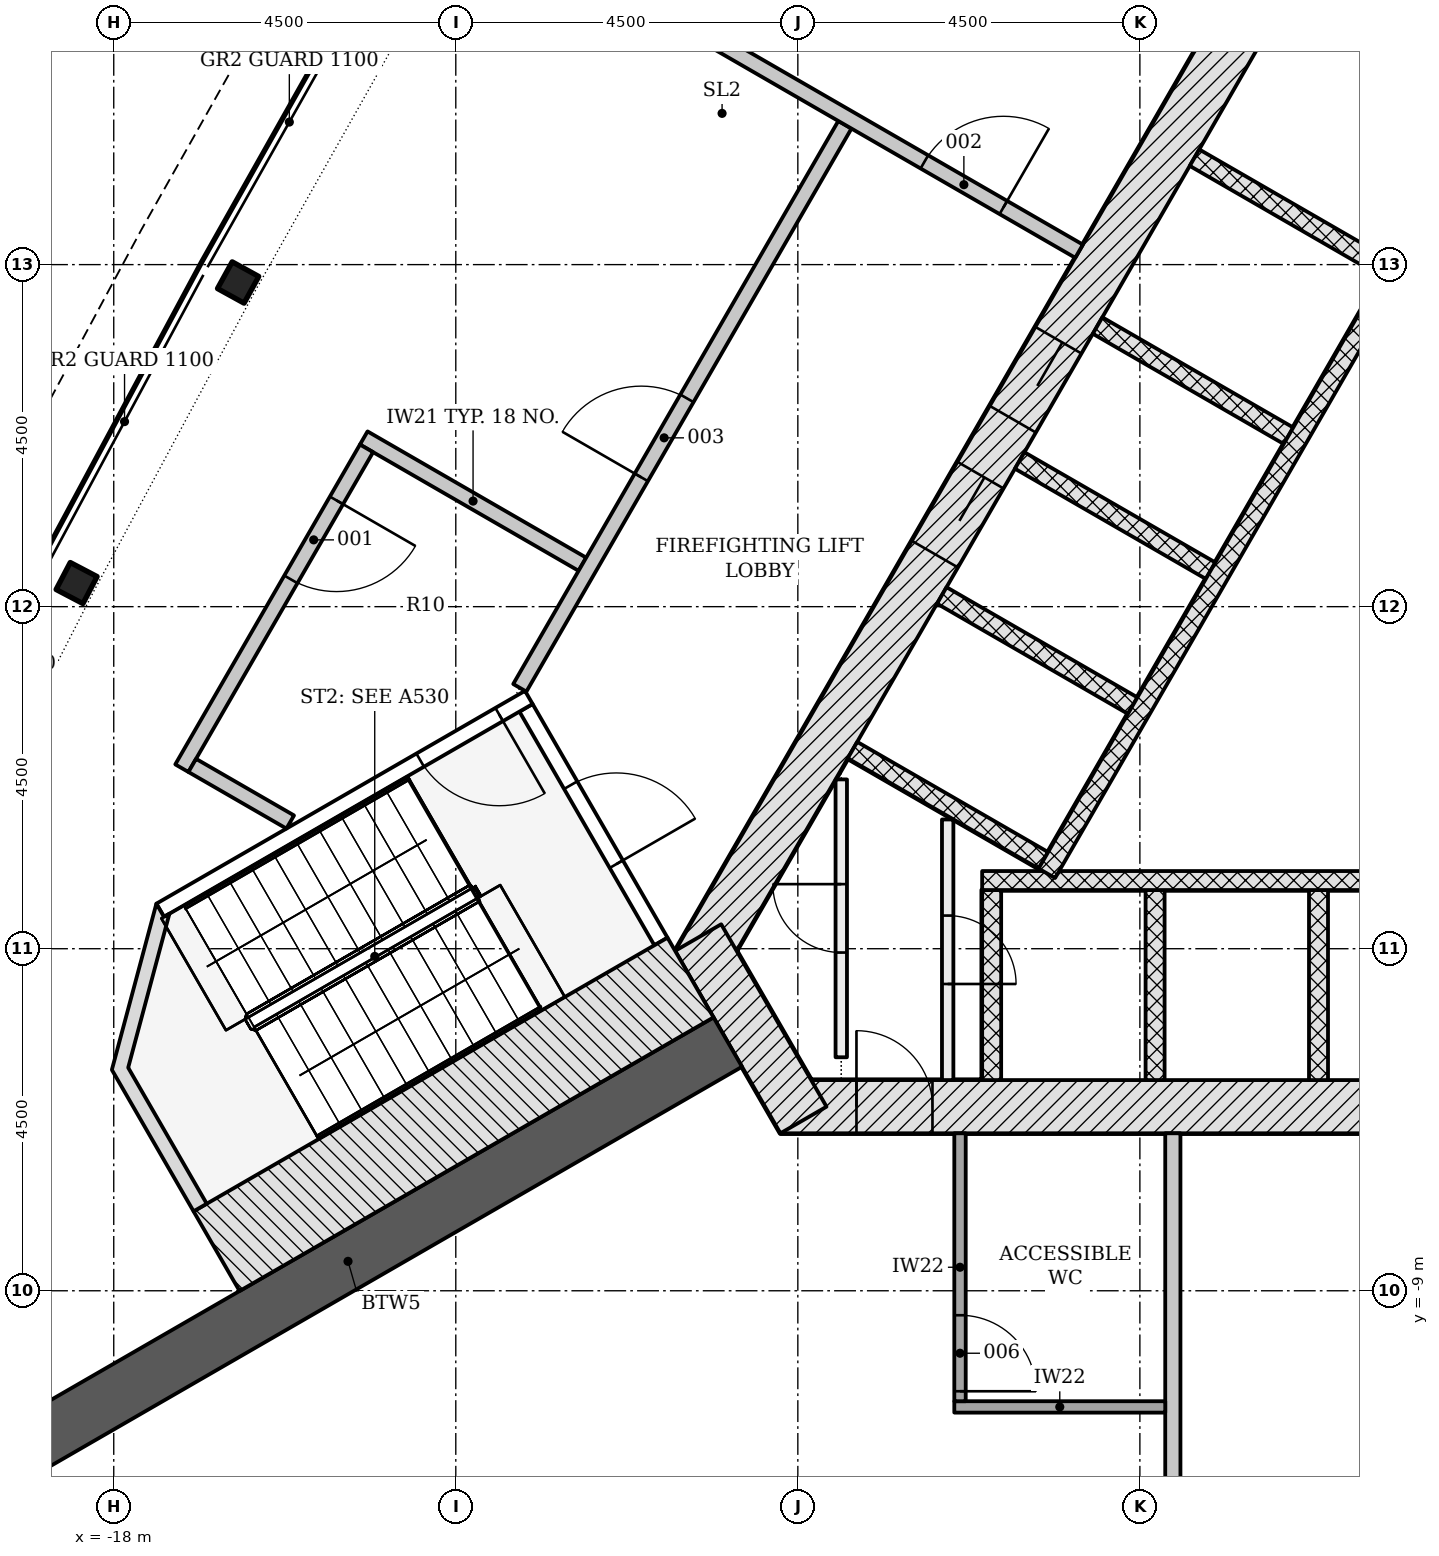
"""IFC4 building model, lengths in metres.
Left out: names, types, materials, properties, quantities, classifications, styles, units other than length and angle.
Written with IfcOpenShell. Run it as: python <this file> out.ifc"""

import sys

from ifc_helpers import new_model, si_unit, direction, frame, frame_2d, origin, origin_2d, place, context, subcontext, project, spatial, polyline, rectangle, i_section, outline, extrude, element, fill, save


model = new_model("IFC4")
c1 = context("Model", 3, precision=1e-05, world=origin(), true_north=direction((0.0, 1.0)))
c2 = subcontext(c1, "Body", "Model", "MODEL_VIEW")
j1 = project(units=[si_unit("LENGTHUNIT", "METRE"), si_unit("PLANEANGLEUNIT", "RADIAN")], contexts=[c1])
p1 = place(None, origin())
s1 = spatial("IfcSite", under=j1, at=p1, CompositionType="ELEMENT")
p2 = place(p1, origin())
s2 = spatial("IfcBuilding", under=s1, at=p2, CompositionType="ELEMENT")
p3 = place(p2, frame((0.0, 0.0, 127.5)))
s3 = spatial("IfcBuildingStorey", under=s2, at=p3, CompositionType="ELEMENT", Elevation=127.5)
p4 = place(p3, frame((-9.229, -6.578, -0.3), z_axis=(0.0, 0.0, 1.0), x_axis=(1.0, 0.0, 0.0)))
e1 = element("IfcWall", 1, at=p4, inside=s3, PredefinedType="SHEAR", context=c2, shape_type="SweptSolid", body=[
    extrude(rectangle(XDim=18.458, YDim=0.7, at=frame_2d((9.229, 0.0))), origin(), (0.0, 0.0, 1.0), 7.2),
])
p5 = place(p4, frame((1.0, 0.0, 0.3)))
e2 = element("IfcOpeningElement", 2, at=p5, cuts=e1, PredefinedType="OPENING", context=c2, shape_type="SweptSolid", body=[
    extrude(rectangle(XDim=1.0, YDim=2.1, at=frame_2d((0.5, 1.05))), frame((0.0, 0.36, 0.0), z_axis=(0.0, -1.0, 0.0), x_axis=(1.0, 0.0, 0.0)), (0.0, 0.0, 1.0), 0.72),
])
p6 = place(p4, frame((16.479, 0.0, 0.3)))
e3 = element("IfcOpeningElement", 3, at=p6, cuts=e1, PredefinedType="OPENING", context=c2, shape_type="SweptSolid", body=[
    extrude(rectangle(XDim=0.9, YDim=2.1, at=frame_2d((0.45, 1.05))), frame((0.0, 0.36, 0.0), z_axis=(0.0, -1.0, 0.0), x_axis=(1.0, 0.0, 0.0)), (0.0, 0.0, 1.0), 0.72),
])
p7 = place(p3, frame((-1.083, 11.281, -0.3), z_axis=(0.0, 0.0, 1.0), x_axis=(-0.500001446645, -0.866024568562, 0.0)))
e4 = element("IfcWall", 4, at=p7, inside=s3, PredefinedType="SHEAR", context=c2, shape_type="SweptSolid", body=[
    extrude(rectangle(XDim=18.458, YDim=0.7, at=frame_2d((9.229, 0.0))), origin(), (0.0, 0.0, 1.0), 7.2),
])
p8 = place(p7, frame((8.979, 0.0, 0.3)))
e5 = element("IfcOpeningElement", 5, at=p8, cuts=e4, PredefinedType="OPENING", context=c2, shape_type="SweptSolid", body=[
    extrude(rectangle(XDim=1.2, YDim=2.1, at=frame_2d((0.6, 1.05))), frame((0.0, 0.36, 0.0), z_axis=(0.0, -1.0, 0.0), x_axis=(1.0, 0.0, 0.0)), (0.0, 0.0, 1.0), 0.72),
])
p9 = place(p7, frame((11.029, 0.0, 0.3)))
e6 = element("IfcOpeningElement", 6, at=p9, cuts=e4, PredefinedType="OPENING", context=c2, shape_type="SweptSolid", body=[
    extrude(rectangle(XDim=1.2, YDim=2.1, at=frame_2d((0.6, 1.05))), frame((0.0, 0.36, 0.0), z_axis=(0.0, -1.0, 0.0), x_axis=(1.0, 0.0, 0.0)), (0.0, 0.0, 1.0), 0.72),
])
p10 = place(p3, frame((-10.311, -4.353, -0.3), z_axis=(0.0, 0.0, 1.0), x_axis=(0.500042739161, -0.866000726912, 0.0)))
e7 = element("IfcWall", 7, at=p10, inside=s3, PredefinedType="SHEAR", context=c2, shape_type="SweptSolid", body=[
    extrude(rectangle(XDim=2.771, YDim=0.7, at=frame_2d((1.386, 0.0))), origin(), (0.0, 0.0, 1.0), 7.2),
])
p11 = place(p3, frame((-9.922, -5.728, -0.3), z_axis=(0.0, 0.0, 1.0), x_axis=(-0.866024913782, -0.500000848707, 0.0)))
e8 = element("IfcWall", 8, at=p11, inside=s3, PredefinedType="SHEAR", context=c2, shape_type="SweptSolid", body=[
    extrude(rectangle(XDim=11.539, YDim=0.75, at=frame_2d((5.769, 0.0))), origin(), (0.0, 0.0, 1.0), 7.2),
])
for number, where, z_axis, x_axis in (
    (9, (-16.364, 4.265, -0.3), (0.0, 0.0, 1.0), (-0.482, -0.876, 0.0)),
    (10, (-18.489, 0.311, -0.3), (0.0, 0.0, 1.0), (-0.464, -0.886, 0.0)),
):
    element("IfcColumn", number, at=place(p3, frame(where, z_axis=z_axis, x_axis=x_axis)), inside=s3, PredefinedType="COLUMN", context=c2, shape_type="SweptSolid", body=[
        extrude(i_section(OverallWidth=0.401, OverallDepth=0.399, WebThickness=0.025, FlangeThickness=0.04, FilletRadius=0.015, at=origin_2d()), origin(), (0.0, 0.0, 1.0), 7.2),
    ])
for number, where, z_axis, x_axis in (
    (11, (-6.45, -6.228, -0.3), (0.0, 0.0, 1.0), (0.0, 1.0, 0.0)),
    (12, (-4.3, -6.228, -0.3), (0.0, 0.0, 1.0), (0.0, 1.0, 0.0)),
    (13, (-2.15, -6.228, -0.3), (0.0, 0.0, 1.0), (0.0, 1.0, 0.0)),
):
    element("IfcWall", number, at=place(p3, frame(where, z_axis=z_axis, x_axis=x_axis)), inside=s3, PredefinedType="PARTITIONING", context=c2, shape_type="SweptSolid", body=[
        extrude(rectangle(XDim=2.5, YDim=0.25, at=frame_2d((1.25, 0.0))), origin(), (0.0, 0.0, 1.0), 7.2),
    ])
p12 = place(p3, frame((-6.575, -3.603, 0.0), z_axis=(0.0, 0.0, 1.0), x_axis=(1.0, 0.0, 0.0)))
e14 = element("IfcWall", 14, at=p12, inside=s3, PredefinedType="PARTITIONING", context=c2, shape_type="SweptSolid", body=[
    extrude(rectangle(XDim=13.15, YDim=0.25, at=frame_2d((6.575, 0.0))), origin(), (0.0, 0.0, 1.0), 6.9),
])
p13 = place(p3, frame((-2.506, 8.115, -0.3), z_axis=(0.0, 0.0, 1.0), x_axis=(0.865996321171, -0.50005036918, 0.0)))
e15 = element("IfcWall", 15, at=p13, inside=s3, PredefinedType="PARTITIONING", context=c2, shape_type="SweptSolid", body=[
    extrude(rectangle(XDim=2.9, YDim=0.25, at=frame_2d((1.45, 0.0))), origin(), (0.0, 0.0, 1.0), 7.2),
])
for number, where, z_axis, x_axis in (
    (16, (-3.781, 5.907, -0.3), (0.0, 0.0, 1.0), (0.866, -0.5, 0.0)),
    (17, (-5.056, 3.699, -0.3), (0.0, 0.0, 1.0), (0.866, -0.5, 0.0)),
    (18, (-6.081, 1.923, -0.3), (0.0, 0.0, 1.0), (0.866, -0.5, 0.0)),
    (19, (-7.106, 0.148, -0.3), (0.0, 0.0, 1.0), (0.866, -0.5, 0.0)),
    (20, (-8.281, -1.887, -0.3), (0.0, 0.0, 1.0), (0.866, -0.5, 0.0)),
):
    element("IfcWall", number, at=place(p3, frame(where, z_axis=z_axis, x_axis=x_axis)), inside=s3, PredefinedType="PARTITIONING", context=c2, shape_type="SweptSolid", body=[
        extrude(rectangle(XDim=2.9, YDim=0.25, at=frame_2d((1.45, 0.0))), origin(), (0.0, 0.0, 1.0), 7.2),
    ])
p14 = place(p3, frame((0.176, 6.711, 0.0), z_axis=(0.0, 0.0, 1.0), x_axis=(-0.500004227369, -0.866022963098, 0.0)))
e21 = element("IfcWall", 21, at=p14, inside=s3, PredefinedType="PARTITIONING", context=c2, shape_type="SweptSolid", body=[
    extrude(rectangle(XDim=11.8, YDim=0.25, at=frame_2d((5.9, 0.0))), origin(), (0.0, 0.0, 1.0), 6.9),
])
p15 = place(p3, frame((-8.429, -5.928, 0.0), z_axis=(0.0, 0.0, 1.0), x_axis=(0.0, 1.0, 0.0)))
e22 = element("IfcWall", 22, at=p15, inside=s3, PredefinedType="PARTITIONING", context=c2, shape_type="SweptSolid", body=[
    extrude(rectangle(XDim=3.656, YDim=0.15, at=frame_2d((1.828, 0.0))), origin(), (0.0, 0.0, 1.0), 6.9),
])
p16 = place(p15, frame((1.378, 0.0, 0.0)))
e23 = element("IfcOpeningElement", 23, at=p16, cuts=e22, PredefinedType="OPENING", context=c2, shape_type="SweptSolid", body=[
    extrude(rectangle(XDim=0.9, YDim=2.1, at=frame_2d((0.45, 1.05))), frame((0.0, 0.085, 0.0), z_axis=(0.0, -1.0, 0.0), x_axis=(1.0, 0.0, 0.0)), (0.0, 0.0, 1.0), 0.17),
])
p17 = place(p3, frame((-7.029, -2.8, 0.0), z_axis=(0.0, 0.0, 1.0), x_axis=(0.0, -1.0, 0.0)))
e24 = element("IfcWall", 24, at=p17, inside=s3, PredefinedType="PARTITIONING", context=c2, shape_type="SweptSolid", body=[
    extrude(rectangle(XDim=3.428, YDim=0.15, at=frame_2d((1.714, 0.0))), origin(), (0.0, 0.0, 1.0), 6.9),
])
p18 = place(p17, frame((1.264, 0.0, 0.0)))
e25 = element("IfcOpeningElement", 25, at=p18, cuts=e24, PredefinedType="OPENING", context=c2, shape_type="SweptSolid", body=[
    extrude(rectangle(XDim=0.9, YDim=2.1, at=frame_2d((0.45, 1.05))), frame((0.0, 0.085, 0.0), z_axis=(0.0, -1.0, 0.0), x_axis=(1.0, 0.0, 0.0)), (0.0, 0.0, 1.0), 0.17),
])
p19 = place(p3, frame((-12.576, -1.331, -0.3), z_axis=(0.0, 0.0, 1.0), x_axis=(0.499970499736, -0.8660424351, 0.0)))
e26 = element("IfcWall", 26, at=p19, inside=s3, PredefinedType="SHEAR", context=c2, shape_type="SweptSolid", body=[
    extrude(rectangle(XDim=3.55, YDim=0.2, at=frame_2d((1.775, 0.0))), origin(), (0.0, 0.0, 1.0), 7.2),
])
p20 = place(p19, frame((1.175, 0.0, 0.3)))
e27 = element("IfcOpeningElement", 27, at=p20, cuts=e26, PredefinedType="OPENING", context=c2, shape_type="SweptSolid", body=[
    extrude(rectangle(XDim=1.2, YDim=2.1, at=frame_2d((0.6, 1.05))), frame((0.0, 0.11, 0.0), z_axis=(0.0, -1.0, 0.0), x_axis=(1.0, 0.0, 0.0)), (0.0, 0.0, 1.0), 0.22),
])
p21 = place(p3, frame((-12.539, -1.194, -0.3), z_axis=(0.0, 0.0, 1.0), x_axis=(-0.866045472092, -0.499965239061, 0.0)))
e28 = element("IfcWall", 28, at=p21, inside=s3, PredefinedType="SHEAR", context=c2, shape_type="SweptSolid", body=[
    extrude(rectangle(XDim=5.6, YDim=0.2, at=frame_2d((2.8, 0.0))), origin(), (0.0, 0.0, 1.0), 7.2),
])
p22 = place(p21, frame((0.45, 0.0, 0.3)))
e29 = element("IfcOpeningElement", 29, at=p22, cuts=e28, PredefinedType="OPENING", context=c2, shape_type="SweptSolid", body=[
    extrude(rectangle(XDim=1.2, YDim=2.1, at=frame_2d((0.6, 1.05))), frame((0.0, 0.11, 0.0), z_axis=(0.0, -1.0, 0.0), x_axis=(1.0, 0.0, 0.0)), (0.0, 0.0, 1.0), 0.22),
])
p23 = place(p3, frame((-10.412, -4.879, -0.3), z_axis=(0.0, 0.0, 1.0), x_axis=(-0.866026919366, -0.499997374926, 0.0)))
e30 = element("IfcWall", 30, at=p23, inside=s3, PredefinedType="SHEAR", context=c2, shape_type="SweptSolid", body=[
    extrude(rectangle(XDim=7.2, YDim=1.211, at=frame_2d((3.6, 0.0))), origin(), (0.0, 0.0, 1.0), 7.2),
])
p24 = place(p3, frame((0.0, 0.0, -0.3)))
e31 = element("IfcWall", 31, at=p24, inside=s3, PredefinedType="SHEAR", context=c2, shape_type="SweptSolid", body=[
    extrude(outline(polyline([(-17.439, -3.907), (-18.025, -6.093), (-16.95, -7.955), (-16.777, -7.855), (-17.81, -6.065), (-17.267, -4.039), (-17.339, -4.081), (-17.339, -4.081), (-17.339, -4.081), (-17.339, -4.081), (-17.339, -4.081), (-17.339, -4.081), (-17.339, -4.081), (-17.339, -4.081), (-17.339, -4.081), (-17.339, -4.081), (-17.339, -4.081), (-17.339, -4.081), (-17.339, -4.081), (-17.339, -4.081), (-17.339, -4.081), (-17.339, -4.081), (-17.339, -4.081), (-17.439, -3.907)])), origin(), (0.0, 0.0, 1.0), 7.2),
])
p25 = place(p3, frame((-14.711, 2.219, 0.0), z_axis=(0.0, 0.0, 1.0), x_axis=(0.866022801149, -0.500004507869, 0.0)))
e32 = element("IfcWall", 32, at=p25, inside=s3, PredefinedType="PARTITIONING", context=c2, shape_type="SweptSolid", body=[
    extrude(rectangle(XDim=3.322, YDim=0.2, at=frame_2d((1.661, 0.0))), origin(), (0.0, 0.0, 1.0), 6.9),
])
p26 = place(p3, frame((-12.658, -1.068, 0.0), z_axis=(0.0, 0.0, 1.0), x_axis=(0.500000816281, 0.866024932504, 0.0)))
e33 = element("IfcWall", 33, at=p26, inside=s3, PredefinedType="PARTITIONING", context=c2, shape_type="SweptSolid", body=[
    extrude(rectangle(XDim=8.554, YDim=0.2, at=frame_2d((4.277, 0.0))), origin(), (0.0, 0.0, 1.0), 6.347),
])
p27 = place(p26, frame((3.198, 0.0, 0.0)))
e34 = element("IfcOpeningElement", 34, at=p27, cuts=e33, PredefinedType="OPENING", context=c2, shape_type="SweptSolid", body=[
    extrude(rectangle(XDim=1.2, YDim=2.1, at=frame_2d((0.6, 1.05))), frame((0.0, 0.11, 0.0), z_axis=(0.0, -1.0, 0.0), x_axis=(1.0, 0.0, 0.0)), (0.0, 0.0, 1.0), 0.22),
])
p28 = place(p3, frame((-11.077, 8.012, 0.0), z_axis=(0.0, 0.0, 1.0), x_axis=(0.866022858982, -0.500004407701, 0.0)))
e35 = element("IfcWall", 35, at=p28, inside=s3, PredefinedType="PARTITIONING", context=c2, shape_type="SweptSolid", body=[
    extrude(rectangle(XDim=6.671, YDim=0.2, at=frame_2d((3.335, 0.0))), origin(), (0.0, 0.0, 1.0), 6.9),
])
p29 = place(p28, frame((4.321, 0.0, 0.0)))
e36 = element("IfcOpeningElement", 36, at=p29, cuts=e35, PredefinedType="OPENING", context=c2, shape_type="SweptSolid", body=[
    extrude(rectangle(XDim=1.2, YDim=2.1, at=frame_2d((0.6, 1.05))), frame((0.0, 0.11, 0.0), z_axis=(0.0, -1.0, 0.0), x_axis=(1.0, 0.0, 0.0)), (0.0, 0.0, 1.0), 0.22),
])
p30 = place(p3, frame((-14.675, 2.083, 0.0), z_axis=(0.0, 0.0, 1.0), x_axis=(-0.499992114976, -0.866029956157, 0.0)))
e37 = element("IfcWall", 37, at=p30, inside=s3, PredefinedType="PARTITIONING", context=c2, shape_type="SweptSolid", body=[
    extrude(rectangle(XDim=4.859, YDim=0.2, at=frame_2d((2.429, 0.0))), origin(), (0.0, 0.0, 1.0), 6.423),
])
p31 = place(p30, frame((0.79, 0.0, 0.0)))
e38 = element("IfcOpeningElement", 38, at=p31, cuts=e37, PredefinedType="OPENING", context=c2, shape_type="SweptSolid", body=[
    extrude(rectangle(XDim=1.2, YDim=2.1, at=frame_2d((0.6, 1.05))), frame((0.0, 0.11, 0.0), z_axis=(0.0, -1.0, 0.0), x_axis=(1.0, 0.0, 0.0)), (0.0, 0.0, 1.0), 0.22),
])
p32 = place(p3, frame((-16.967, -2.089, 0.0), z_axis=(0.0, 0.0, 1.0), x_axis=(0.866024464444, -0.500001626982, 0.0)))
e39 = element("IfcWall", 39, at=p32, inside=s3, PredefinedType="PARTITIONING", context=c2, shape_type="SweptSolid", body=[
    extrude(rectangle(XDim=1.489, YDim=0.2, at=frame_2d((0.744, 0.0))), origin(), (0.0, 0.0, 1.0), 6.9),
])
p33 = place(p3, frame((-4.066, -13.399, 0.0), z_axis=(0.0, 0.0, 1.0), x_axis=(0.0, 1.0, 0.0)))
e40 = element("IfcWall", 40, at=p33, inside=s3, PredefinedType="PARTITIONING", context=c2, shape_type="SweptSolid", body=[
    extrude(rectangle(XDim=6.471, YDim=0.2, at=frame_2d((3.235, 0.0))), origin(), (0.0, 0.0, 1.0), 6.9),
])
p34 = place(p3, frame((-6.941, -10.528, 0.0), z_axis=(0.0, 0.0, 1.0), x_axis=(1.0, 0.0, 0.0)))
e41 = element("IfcWall", 41, at=p34, inside=s3, PredefinedType="PARTITIONING", context=c2, shape_type="SweptSolid", body=[
    extrude(rectangle(XDim=2.775, YDim=0.15, at=frame_2d((1.387, 0.0))), origin(), (0.0, 0.0, 1.0), 6.347),
])
p35 = place(p3, frame((-6.866, -6.928, 0.0), z_axis=(0.0, 0.0, 1.0), x_axis=(0.0, -1.0, 0.0)))
e42 = element("IfcWall", 42, at=p35, inside=s3, PredefinedType="PARTITIONING", context=c2, shape_type="SweptSolid", body=[
    extrude(rectangle(XDim=3.525, YDim=0.15, at=frame_2d((1.762, 0.0))), origin(), (0.0, 0.0, 1.0), 6.9),
])
p36 = place(p35, frame((2.394, 0.0, 0.0)))
e43 = element("IfcOpeningElement", 43, at=p36, cuts=e42, PredefinedType="OPENING", context=c2, shape_type="SweptSolid", body=[
    extrude(rectangle(XDim=1.0, YDim=2.1, at=frame_2d((0.5, 1.05))), frame((0.0, 0.085, 0.0), z_axis=(0.0, -1.0, 0.0), x_axis=(1.0, 0.0, 0.0)), (0.0, 0.0, 1.0), 0.17),
])
p37 = place(p8, origin())
e44 = element("IfcDoor", 44, at=p37, inside=s3, OperationType="DOUBLE_DOOR_SLIDING", PredefinedType="DOOR", context=c2, shape_type="SweptSolid", body=[
    extrude(rectangle(XDim=1.2, YDim=2.1, at=frame_2d((0.6, 1.05))), frame((0.0, 0.025, 0.0), z_axis=(0.0, -1.0, 0.0), x_axis=(1.0, 0.0, 0.0)), (0.0, 0.0, 1.0), 0.05),
])
fill(e5, e44)
p38 = place(p9, origin())
e45 = element("IfcDoor", 45, at=p38, inside=s3, OperationType="DOUBLE_DOOR_SLIDING", PredefinedType="DOOR", context=c2, shape_type="SweptSolid", body=[
    extrude(rectangle(XDim=1.2, YDim=2.1, at=frame_2d((0.6, 1.05))), frame((0.0, 0.025, 0.0), z_axis=(0.0, -1.0, 0.0), x_axis=(1.0, 0.0, 0.0)), (0.0, 0.0, 1.0), 0.05),
])
fill(e6, e45)
p39 = place(p5, origin())
e46 = element("IfcDoor", 46, at=p39, inside=s3, OperationType="SINGLE_SWING_LEFT", PredefinedType="DOOR", context=c2, shape_type="SweptSolid", body=[
    extrude(rectangle(XDim=1.0, YDim=2.1, at=frame_2d((0.5, 1.05))), frame((0.0, 0.075, 0.0), z_axis=(0.0, -1.0, 0.0), x_axis=(1.0, 0.0, 0.0)), (0.0, 0.0, 1.0), 0.15),
])
fill(e2, e46)
p40 = place(p16, origin())
e47 = element("IfcDoor", 47, at=p40, inside=s3, OperationType="SINGLE_SWING_RIGHT", PredefinedType="DOOR", context=c2, shape_type="SweptSolid", body=[
    extrude(rectangle(XDim=0.9, YDim=2.1, at=frame_2d((0.45, 1.05))), frame((0.0, 0.025, 0.0), z_axis=(0.0, -1.0, 0.0), x_axis=(1.0, 0.0, 0.0)), (0.0, 0.0, 1.0), 0.05),
])
fill(e23, e47)
p41 = place(p18, origin())
e48 = element("IfcDoor", 48, at=p41, inside=s3, OperationType="SINGLE_SWING_RIGHT", PredefinedType="DOOR", context=c2, shape_type="SweptSolid", body=[
    extrude(rectangle(XDim=0.9, YDim=2.1, at=frame_2d((0.45, 1.05))), frame((0.0, 0.025, 0.0), z_axis=(0.0, -1.0, 0.0), x_axis=(1.0, 0.0, 0.0)), (0.0, 0.0, 1.0), 0.05),
])
fill(e25, e48)
p42 = place(p20, origin())
e49 = element("IfcDoor", 49, at=p42, inside=s3, OperationType="SINGLE_SWING_RIGHT", PredefinedType="DOOR", context=c2, shape_type="SweptSolid", body=[
    extrude(rectangle(XDim=1.2, YDim=2.1, at=frame_2d((0.6, 1.05))), frame((0.0, 0.025, 0.0), z_axis=(0.0, -1.0, 0.0), x_axis=(1.0, 0.0, 0.0)), (0.0, 0.0, 1.0), 0.05),
])
fill(e27, e49)
p43 = place(p22, origin())
e50 = element("IfcDoor", 50, at=p43, inside=s3, OperationType="SINGLE_SWING_LEFT", PredefinedType="DOOR", context=c2, shape_type="SweptSolid", body=[
    extrude(rectangle(XDim=1.2, YDim=2.1, at=frame_2d((0.6, 1.05))), frame((0.0, 0.025, 0.0), z_axis=(0.0, -1.0, 0.0), x_axis=(1.0, 0.0, 0.0)), (0.0, 0.0, 1.0), 0.05),
])
fill(e29, e50)
p44 = place(p31, origin())
e51 = element("IfcDoor", 51, at=p44, inside=s3, OperationType="SINGLE_SWING_LEFT", PredefinedType="DOOR", context=c2, shape_type="SweptSolid", body=[
    extrude(rectangle(XDim=1.2, YDim=2.1, at=frame_2d((0.6, 1.05))), frame((0.0, 0.025, 0.0), z_axis=(0.0, -1.0, 0.0), x_axis=(1.0, 0.0, 0.0)), (0.0, 0.0, 1.0), 0.05),
])
fill(e38, e51)
p45 = place(p29, origin())
e52 = element("IfcDoor", 52, at=p45, inside=s3, OperationType="SINGLE_SWING_RIGHT", PredefinedType="DOOR", context=c2, shape_type="SweptSolid", body=[
    extrude(rectangle(XDim=1.2, YDim=2.1, at=frame_2d((0.6, 1.05))), frame((0.0, 0.025, 0.0), z_axis=(0.0, -1.0, 0.0), x_axis=(1.0, 0.0, 0.0)), (0.0, 0.0, 1.0), 0.05),
])
fill(e36, e52)
p46 = place(p27, origin())
e53 = element("IfcDoor", 53, at=p46, inside=s3, OperationType="SINGLE_SWING_LEFT", PredefinedType="DOOR", context=c2, shape_type="SweptSolid", body=[
    extrude(rectangle(XDim=1.2, YDim=2.1, at=frame_2d((0.6, 1.05))), frame((0.0, 0.025, 0.0), z_axis=(0.0, -1.0, 0.0), x_axis=(1.0, 0.0, 0.0)), (0.0, 0.0, 1.0), 0.05),
])
fill(e34, e53)
p47 = place(p36, origin())
e54 = element("IfcDoor", 54, at=p47, inside=s3, OperationType="SINGLE_SWING_RIGHT", PredefinedType="DOOR", context=c2, shape_type="SweptSolid", body=[
    extrude(rectangle(XDim=1.0, YDim=2.1, at=frame_2d((0.5, 1.05))), frame((0.0, 0.025, 0.0), z_axis=(0.0, -1.0, 0.0), x_axis=(1.0, 0.0, 0.0)), (0.0, 0.0, 1.0), 0.05),
])
fill(e43, e54)
save(model, sys.argv[1])
